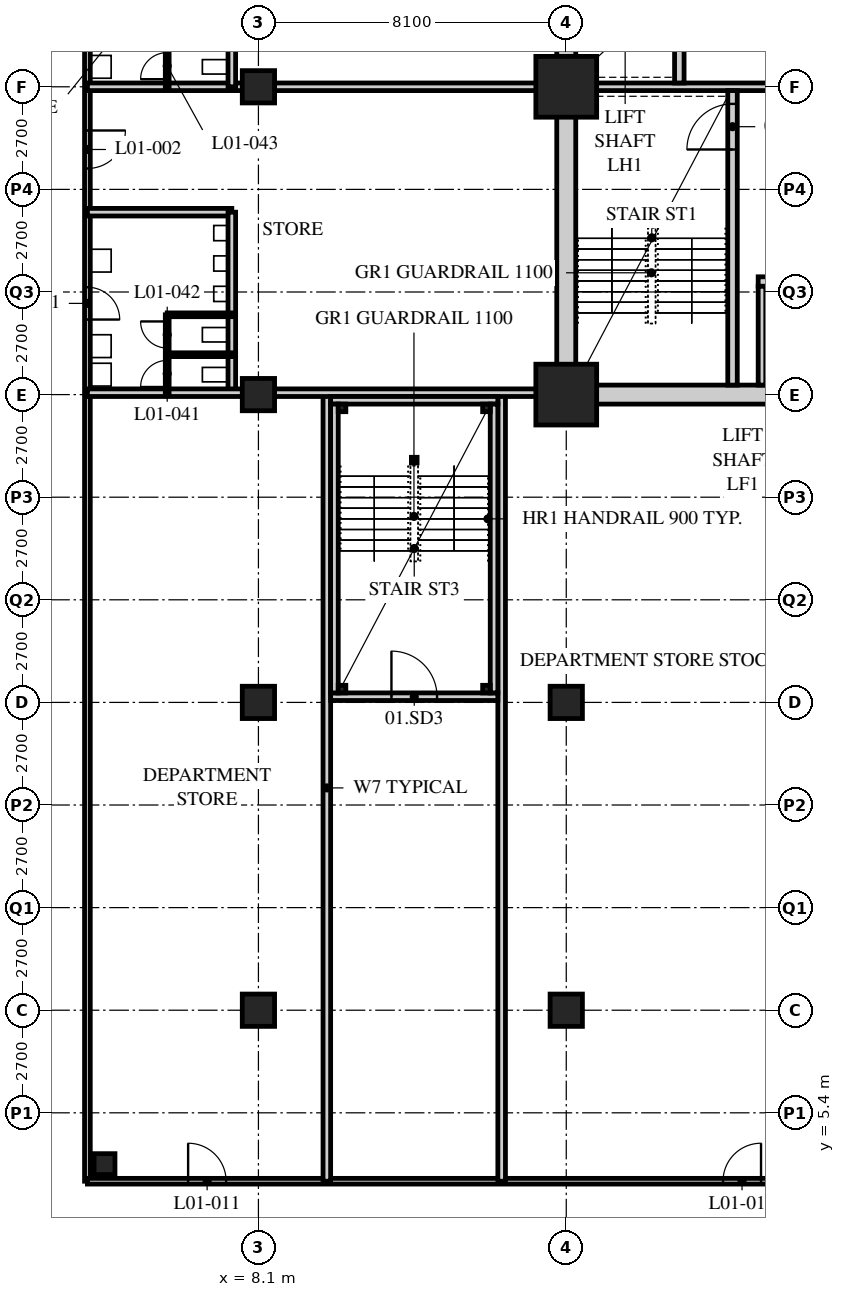
"""IFC4 building model, lengths in metres.
Left out: names, types, materials, properties, quantities, classifications, styles, units other than length and angle.
Written with IfcOpenShell. Run it as: python <this file> out.ifc"""

import sys

from ifc_helpers import new_model, si_unit, direction, frame, frame_2d, origin, origin_2d, place, context, subcontext, project, spatial, rectangle, hollow_rectangle, extrude, element, fill, save


model = new_model("IFC4")
c1 = context("Model", 3, precision=1e-05, world=origin(), true_north=direction((0.0, 1.0)))
c2 = subcontext(c1, "Body", "Model", "MODEL_VIEW")
j1 = project(units=[si_unit("LENGTHUNIT", "METRE"), si_unit("PLANEANGLEUNIT", "RADIAN")], contexts=[c1])
p1 = place(None, origin())
s1 = spatial("IfcSite", under=j1, at=p1, CompositionType="ELEMENT")
p2 = place(p1, origin())
s2 = spatial("IfcBuilding", under=s1, at=p2, CompositionType="ELEMENT")
p3 = place(p2, frame((0.0, 0.0, 6.0)))
s3 = spatial("IfcBuildingStorey", under=s2, at=p3, CompositionType="ELEMENT", Elevation=6.0)
p4 = place(p3, frame((4.05, 4.05, 0.0), z_axis=(0.0, 0.0, 1.0), x_axis=(1.0, 0.0, 0.0)))
e1 = element("IfcColumn", 1, at=p4, inside=s3, PredefinedType="COLUMN", context=c2, shape_type="SweptSolid", body=[
    extrude(hollow_rectangle(XDim=0.55, YDim=0.55, WallThickness=0.05, at=origin_2d()), origin(), (0.0, 0.0, 1.0), 5.4),
])
for number, where, z_axis, x_axis in (
    (2, (8.1, 8.1, 0.0), (0.0, 0.0, 1.0), (1.0, 0.0, 0.0)),
    (3, (8.1, 16.2, 0.0), (0.0, 0.0, 1.0), (1.0, 0.0, 0.0)),
    (4, (8.1, 24.3, 0.0), (0.0, 0.0, 1.0), (1.0, 0.0, 0.0)),
    (5, (8.1, 32.4, 0.0), (0.0, 0.0, 1.0), (1.0, 0.0, 0.0)),
    (6, (16.2, 8.1, 0.0), (0.0, 0.0, 1.0), (1.0, 0.0, 0.0)),
    (7, (16.2, 16.2, 0.0), (0.0, 0.0, 1.0), (1.0, 0.0, 0.0)),
):
    element("IfcColumn", number, at=place(p3, frame(where, z_axis=z_axis, x_axis=x_axis)), inside=s3, PredefinedType="COLUMN", context=c2, shape_type="SweptSolid", body=[
        extrude(hollow_rectangle(XDim=0.85, YDim=0.85, WallThickness=0.085, at=origin_2d()), origin(), (0.0, 0.0, 1.0), 5.4),
    ])
for number, where, z_axis, x_axis in (
    (8, (16.2, 24.3, 0.0), (0.0, 0.0, 1.0), (1.0, 0.0, 0.0)),
    (9, (16.2, 32.4, 0.0), (0.0, 0.0, 1.0), (1.0, 0.0, 0.0)),
):
    element("IfcColumn", number, at=place(p3, frame(where, z_axis=z_axis, x_axis=x_axis)), inside=s3, PredefinedType="COLUMN", context=c2, shape_type="SweptSolid", body=[
        extrude(hollow_rectangle(XDim=1.6, YDim=1.6, WallThickness=0.15, at=origin_2d()), origin(), (0.0, 0.0, 1.0), 5.4),
    ])
p5 = place(p3, frame((3.6, 40.5, 0.0), z_axis=(0.0, 0.0, 1.0), x_axis=(0.0, -1.0, 0.0)))
e10 = element("IfcWall", 10, at=p5, inside=s3, PredefinedType="PARTITIONING", context=c2, shape_type="SweptSolid", body=[
    extrude(rectangle(XDim=36.9, YDim=0.15, at=frame_2d((18.45, 0.0))), origin(), (0.0, 0.0, 1.0), 5.15),
])
p6 = place(p5, frame((13.375, 0.0, 0.0)))
e11 = element("IfcOpeningElement", 11, at=p6, cuts=e10, PredefinedType="OPENING", context=c2, shape_type="SweptSolid", body=[
    extrude(rectangle(XDim=0.85, YDim=2.1, at=frame_2d((0.425, 1.05))), frame((0.0, 0.085, 0.0), z_axis=(0.0, -1.0, 0.0), x_axis=(1.0, 0.0, 0.0)), (0.0, 0.0, 1.0), 0.17),
])
p7 = place(p5, frame((9.25, 0.0, 0.0)))
e12 = element("IfcOpeningElement", 12, at=p7, cuts=e10, PredefinedType="OPENING", context=c2, shape_type="SweptSolid", body=[
    extrude(rectangle(XDim=1.0, YDim=2.1, at=frame_2d((0.5, 1.05))), frame((0.0, 0.085, 0.0), z_axis=(0.0, -1.0, 0.0), x_axis=(1.0, 0.0, 0.0)), (0.0, 0.0, 1.0), 0.17),
])
p8 = place(p5, frame((4.875, 0.0, 0.0)))
e13 = element("IfcOpeningElement", 13, at=p8, cuts=e10, PredefinedType="OPENING", context=c2, shape_type="SweptSolid", body=[
    extrude(rectangle(XDim=0.85, YDim=2.1, at=frame_2d((0.425, 1.05))), frame((0.0, 0.085, 0.0), z_axis=(0.0, -1.0, 0.0), x_axis=(1.0, 0.0, 0.0)), (0.0, 0.0, 1.0), 0.17),
])
p9 = place(p5, frame((0.75, 0.0, 0.0)))
e14 = element("IfcOpeningElement", 14, at=p9, cuts=e10, PredefinedType="OPENING", context=c2, shape_type="SweptSolid", body=[
    extrude(rectangle(XDim=1.0, YDim=2.1, at=frame_2d((0.5, 1.05))), frame((0.0, 0.085, 0.0), z_axis=(0.0, -1.0, 0.0), x_axis=(1.0, 0.0, 0.0)), (0.0, 0.0, 1.0), 0.17),
])
p10 = place(p3, frame((3.6, 3.6, 0.0), z_axis=(0.0, 0.0, 1.0), x_axis=(1.0, 0.0, 0.0)))
e15 = element("IfcWall", 15, at=p10, inside=s3, PredefinedType="PARTITIONING", context=c2, shape_type="SweptSolid", body=[
    extrude(rectangle(XDim=23.54, YDim=0.15, at=frame_2d((11.77, 0.0))), origin(), (0.0, 0.0, 1.0), 5.15),
])
p11 = place(p10, frame((2.65, 0.0, 0.0)))
e16 = element("IfcOpeningElement", 16, at=p11, cuts=e15, PredefinedType="OPENING", context=c2, shape_type="SweptSolid", body=[
    extrude(rectangle(XDim=1.0, YDim=2.1, at=frame_2d((0.5, 1.05))), frame((0.0, 0.085, 0.0), z_axis=(0.0, -1.0, 0.0), x_axis=(1.0, 0.0, 0.0)), (0.0, 0.0, 1.0), 0.17),
])
p12 = place(p10, frame((16.725, 0.0, 0.0)))
e17 = element("IfcOpeningElement", 17, at=p12, cuts=e15, PredefinedType="OPENING", context=c2, shape_type="SweptSolid", body=[
    extrude(rectangle(XDim=1.0, YDim=2.1, at=frame_2d((0.5, 1.05))), frame((0.0, 0.085, 0.0), z_axis=(0.0, -1.0, 0.0), x_axis=(1.0, 0.0, 0.0)), (0.0, 0.0, 1.0), 0.17),
])
p13 = place(p3, frame((3.6, 32.4, 0.0), z_axis=(0.0, 0.0, 1.0), x_axis=(1.0, 0.0, 0.0)))
e18 = element("IfcWall", 18, at=p13, inside=s3, PredefinedType="SOLIDWALL", context=c2, shape_type="SweptSolid", body=[
    extrude(rectangle(XDim=12.6, YDim=0.2, at=frame_2d((6.3, 0.0))), origin(), (0.0, 0.0, 1.0), 4.538),
])
p14 = place(p3, frame((3.6, 29.1, 0.0), z_axis=(0.0, 0.0, 1.0), x_axis=(1.0, 0.0, 0.0)))
e19 = element("IfcWall", 19, at=p14, inside=s3, PredefinedType="SOLIDWALL", context=c2, shape_type="SweptSolid", body=[
    extrude(rectangle(XDim=3.8, YDim=0.2, at=frame_2d((1.9, 0.0))), origin(), (0.0, 0.0, 1.0), 5.15),
])
p15 = place(p3, frame((7.4, 24.3, 0.0), z_axis=(0.0, 0.0, 1.0), x_axis=(0.0, 1.0, 0.0)))
e20 = element("IfcWall", 20, at=p15, inside=s3, PredefinedType="SOLIDWALL", context=c2, shape_type="SweptSolid", body=[
    extrude(rectangle(XDim=4.8, YDim=0.2, at=frame_2d((2.4, 0.0))), origin(), (0.0, 0.0, 1.0), 5.15),
])
p16 = place(p3, frame((7.4, 32.4, 0.0), z_axis=(0.0, 0.0, 1.0), x_axis=(0.0, 1.0, 0.0)))
e21 = element("IfcWall", 21, at=p16, inside=s3, PredefinedType="SOLIDWALL", context=c2, shape_type="SweptSolid", body=[
    extrude(rectangle(XDim=5.6, YDim=0.2, at=frame_2d((2.8, 0.0))), origin(), (0.0, 0.0, 1.0), 5.15),
])
for number, where, z_axis, x_axis in (
    (22, (9.9, 3.6, 0.0), (0.0, 0.0, 1.0), (0.0, 1.0, 0.0)),
    (23, (14.5, 3.6, 0.0), (0.0, 0.0, 1.0), (0.0, 1.0, 0.0)),
):
    element("IfcWall", number, at=place(p3, frame(where, z_axis=z_axis, x_axis=x_axis)), inside=s3, PredefinedType="SOLIDWALL", context=c2, shape_type="SweptSolid", body=[
        extrude(rectangle(XDim=20.7, YDim=0.2, at=frame_2d((10.35, 0.0))), origin(), (0.0, 0.0, 1.0), 5.15),
    ])
p17 = place(p3, frame((3.6, 24.35, 0.0), z_axis=(0.0, 0.0, 1.0), x_axis=(1.0, 0.0, 0.0)))
e24 = element("IfcWall", 24, at=p17, inside=s3, PredefinedType="SOLIDWALL", context=c2, shape_type="SweptSolid", body=[
    extrude(rectangle(XDim=12.6, YDim=0.2, at=frame_2d((6.3, 0.0))), origin(), (0.0, 0.0, 1.0), 4.538),
])
p18 = place(p3, frame((5.7, 24.3, 0.0), z_axis=(0.0, 0.0, 1.0), x_axis=(0.0, 1.0, 0.0)))
e25 = element("IfcWall", 25, at=p18, inside=s3, PredefinedType="PARTITIONING", context=c2, shape_type="SweptSolid", body=[
    extrude(rectangle(XDim=2.1, YDim=0.1, at=frame_2d((1.05, 0.0))), origin(), (0.0, 0.0, 1.0), 5.15),
])
p19 = place(p18, frame((0.2, 0.0, 0.0)))
e26 = element("IfcOpeningElement", 26, at=p19, cuts=e25, PredefinedType="OPENING", context=c2, shape_type="SweptSolid", body=[
    extrude(rectangle(XDim=0.7, YDim=2.0, at=frame_2d((0.35, 1.0))), frame((0.0, 0.06, 0.0), z_axis=(0.0, -1.0, 0.0), x_axis=(1.0, 0.0, 0.0)), (0.0, 0.0, 1.0), 0.12),
])
p20 = place(p18, frame((1.225, 0.0, 0.0)))
e27 = element("IfcOpeningElement", 27, at=p20, cuts=e25, PredefinedType="OPENING", context=c2, shape_type="SweptSolid", body=[
    extrude(rectangle(XDim=0.7, YDim=2.0, at=frame_2d((0.35, 1.0))), frame((0.0, 0.06, 0.0), z_axis=(0.0, -1.0, 0.0), x_axis=(1.0, 0.0, 0.0)), (0.0, 0.0, 1.0), 0.12),
])
for number, where, z_axis, x_axis in (
    (28, (5.7, 25.35, 0.0), (0.0, 0.0, 1.0), (1.0, 0.0, 0.0)),
    (29, (5.7, 26.4, 0.0), (0.0, 0.0, 1.0), (1.0, 0.0, 0.0)),
):
    element("IfcWall", number, at=place(p3, frame(where, z_axis=z_axis, x_axis=x_axis)), inside=s3, PredefinedType="PARTITIONING", context=c2, shape_type="SweptSolid", body=[
        extrude(rectangle(XDim=1.7, YDim=0.1, at=frame_2d((0.85, 0.0))), origin(), (0.0, 0.0, 1.0), 5.15),
    ])
p21 = place(p3, frame((5.7, 32.4, 0.0), z_axis=(0.0, 0.0, 1.0), x_axis=(0.0, 1.0, 0.0)))
e30 = element("IfcWall", 30, at=p21, inside=s3, PredefinedType="PARTITIONING", context=c2, shape_type="SweptSolid", body=[
    extrude(rectangle(XDim=5.25, YDim=0.1, at=frame_2d((2.625, 0.0))), origin(), (0.0, 0.0, 1.0), 5.15),
])
p22 = place(p21, frame((0.2, 0.0, 0.0)))
e31 = element("IfcOpeningElement", 31, at=p22, cuts=e30, PredefinedType="OPENING", context=c2, shape_type="SweptSolid", body=[
    extrude(rectangle(XDim=0.7, YDim=2.0, at=frame_2d((0.35, 1.0))), frame((0.0, 0.06, 0.0), z_axis=(0.0, -1.0, 0.0), x_axis=(1.0, 0.0, 0.0)), (0.0, 0.0, 1.0), 0.12),
])
p23 = place(p21, frame((1.225, 0.0, 0.0)))
e32 = element("IfcOpeningElement", 32, at=p23, cuts=e30, PredefinedType="OPENING", context=c2, shape_type="SweptSolid", body=[
    extrude(rectangle(XDim=0.7, YDim=2.0, at=frame_2d((0.35, 1.0))), frame((0.0, 0.06, 0.0), z_axis=(0.0, -1.0, 0.0), x_axis=(1.0, 0.0, 0.0)), (0.0, 0.0, 1.0), 0.12),
])
p24 = place(p21, frame((2.275, 0.0, 0.0)))
e33 = element("IfcOpeningElement", 33, at=p24, cuts=e30, PredefinedType="OPENING", context=c2, shape_type="SweptSolid", body=[
    extrude(rectangle(XDim=0.7, YDim=2.0, at=frame_2d((0.35, 1.0))), frame((0.0, 0.06, 0.0), z_axis=(0.0, -1.0, 0.0), x_axis=(1.0, 0.0, 0.0)), (0.0, 0.0, 1.0), 0.12),
])
p25 = place(p21, frame((3.325, 0.0, 0.0)))
e34 = element("IfcOpeningElement", 34, at=p25, cuts=e30, PredefinedType="OPENING", context=c2, shape_type="SweptSolid", body=[
    extrude(rectangle(XDim=0.7, YDim=2.0, at=frame_2d((0.35, 1.0))), frame((0.0, 0.06, 0.0), z_axis=(0.0, -1.0, 0.0), x_axis=(1.0, 0.0, 0.0)), (0.0, 0.0, 1.0), 0.12),
])
p26 = place(p21, frame((4.375, 0.0, 0.0)))
e35 = element("IfcOpeningElement", 35, at=p26, cuts=e30, PredefinedType="OPENING", context=c2, shape_type="SweptSolid", body=[
    extrude(rectangle(XDim=0.7, YDim=2.0, at=frame_2d((0.35, 1.0))), frame((0.0, 0.06, 0.0), z_axis=(0.0, -1.0, 0.0), x_axis=(1.0, 0.0, 0.0)), (0.0, 0.0, 1.0), 0.12),
])
p27 = place(p3, frame((15.95, 24.3, 0.0), z_axis=(0.0, 0.0, 1.0), x_axis=(1.0, 0.0, 0.0)))
e36 = element("IfcWall", 36, at=p27, inside=s3, PredefinedType="SOLIDWALL", context=c2, shape_type="SweptSolid", body=[
    extrude(rectangle(XDim=24.8, YDim=0.5, at=frame_2d((12.4, 0.0))), origin(), (0.0, 0.0, 1.0), 4.5),
])
p28 = place(p27, frame((11.5, 0.0, 0.0)))
e37 = element("IfcOpeningElement", 37, at=p28, cuts=e36, PredefinedType="OPENING", context=c2, shape_type="SweptSolid", body=[
    extrude(rectangle(XDim=1.8, YDim=2.4, at=frame_2d((0.9, 1.2))), frame((0.0, 0.26, 0.0), z_axis=(0.0, -1.0, 0.0), x_axis=(1.0, 0.0, 0.0)), (0.0, 0.0, 1.0), 0.52),
])
p29 = place(p3, frame((16.2, 24.55, 0.0), z_axis=(0.0, 0.0, 1.0), x_axis=(0.0, 1.0, 0.0)))
e38 = element("IfcWall", 38, at=p29, inside=s3, PredefinedType="SOLIDWALL", context=c2, shape_type="SweptSolid", body=[
    extrude(rectangle(XDim=15.7, YDim=0.5, at=frame_2d((7.85, 0.0))), origin(), (0.0, 0.0, 1.0), 4.538),
])
p30 = place(p3, frame((16.45, 32.4, 0.0), z_axis=(0.0, 0.0, 1.0), x_axis=(1.0, 0.0, 0.0)))
e39 = element("IfcWall", 39, at=p30, inside=s3, PredefinedType="SOLIDWALL", context=c2, shape_type="SweptSolid", body=[
    extrude(rectangle(XDim=7.95, YDim=0.2, at=frame_2d((3.975, 0.0))), origin(), (0.0, 0.0, 1.0), 4.45),
])
p31 = place(p3, frame((20.575, 24.55, 0.0), z_axis=(0.0, 0.0, 1.0), x_axis=(0.0, 1.0, 0.0)))
e40 = element("IfcWall", 40, at=p31, inside=s3, PredefinedType="SOLIDWALL", context=c2, shape_type="SweptSolid", body=[
    extrude(rectangle(XDim=7.75, YDim=0.25, at=frame_2d((3.875, 0.0))), origin(), (0.0, 0.0, 1.0), 5.15),
])
p32 = place(p31, frame((6.2, 0.0, 0.0)))
e41 = element("IfcOpeningElement", 41, at=p32, cuts=e40, PredefinedType="OPENING", context=c2, shape_type="SweptSolid", body=[
    extrude(rectangle(XDim=1.2, YDim=2.1, at=frame_2d((0.6, 1.05))), frame((0.0, 0.135, 0.0), z_axis=(0.0, -1.0, 0.0), x_axis=(1.0, 0.0, 0.0)), (0.0, 0.0, 1.0), 0.27),
])
p33 = place(p3, frame((21.25, 27.275, 0.0), z_axis=(0.0, 0.0, 1.0), x_axis=(1.0, 0.0, 0.0)))
e42 = element("IfcWall", 42, at=p33, inside=s3, PredefinedType="SOLIDWALL", context=c2, shape_type="SweptSolid", body=[
    extrude(rectangle(XDim=2.95, YDim=0.25, at=frame_2d((1.475, 0.0))), origin(), (0.0, 0.0, 1.0), 5.15),
])
p34 = place(p33, frame((0.95, 0.0, 0.0)))
e43 = element("IfcOpeningElement", 43, at=p34, cuts=e42, PredefinedType="OPENING", context=c2, shape_type="SweptSolid", body=[
    extrude(rectangle(XDim=1.1, YDim=2.4, at=frame_2d((0.55, 1.2))), frame((0.0, 0.135, 0.0), z_axis=(0.0, -1.0, 0.0), x_axis=(1.0, 0.0, 0.0)), (0.0, 0.0, 1.0), 0.27),
])
p35 = place(p3, frame((21.35, 24.55, 0.0), z_axis=(0.0, 0.0, 1.0), x_axis=(0.0, 1.0, 0.0)))
e44 = element("IfcWall", 44, at=p35, inside=s3, PredefinedType="SOLIDWALL", context=c2, shape_type="SweptSolid", body=[
    extrude(rectangle(XDim=2.6, YDim=0.2, at=frame_2d((1.3, 0.0))), origin(), (0.0, 0.0, 1.0), 5.15),
])
p36 = place(p3, frame((19.175, 32.5, 0.0), z_axis=(0.0, 0.0, 1.0), x_axis=(0.0, 1.0, 0.0)))
e45 = element("IfcWall", 45, at=p36, inside=s3, PredefinedType="SOLIDWALL", context=c2, shape_type="SweptSolid", body=[
    extrude(rectangle(XDim=7.75, YDim=0.25, at=frame_2d((3.875, 0.0))), origin(), (0.0, 0.0, 1.0), 5.15),
])
p37 = place(p3, frame((10.0, 16.35, 0.0), z_axis=(0.0, 0.0, 1.0), x_axis=(1.0, 0.0, 0.0)))
e46 = element("IfcWall", 46, at=p37, inside=s3, PredefinedType="SOLIDWALL", context=c2, shape_type="SweptSolid", body=[
    extrude(rectangle(XDim=4.4, YDim=0.2, at=frame_2d((2.2, 0.0))), origin(), (0.0, 0.0, 1.0), 4.538),
])
p38 = place(p37, frame((1.6, 0.0, 0.0)))
e47 = element("IfcOpeningElement", 47, at=p38, cuts=e46, PredefinedType="OPENING", context=c2, shape_type="SweptSolid", body=[
    extrude(rectangle(XDim=1.2, YDim=2.1, at=frame_2d((0.6, 1.05))), frame((0.0, 0.11, 0.0), z_axis=(0.0, -1.0, 0.0), x_axis=(1.0, 0.0, 0.0)), (0.0, 0.0, 1.0), 0.22),
])
p39 = place(p3, frame((10.0, 24.15, 0.0), z_axis=(0.0, 0.0, 1.0), x_axis=(1.0, 0.0, 0.0)))
e48 = element("IfcWall", 48, at=p39, inside=s3, PredefinedType="SOLIDWALL", context=c2, shape_type="SweptSolid", body=[
    extrude(rectangle(XDim=4.4, YDim=0.2, at=frame_2d((2.2, 0.0))), origin(), (0.0, 0.0, 1.0), 4.538),
])
for number, where, z_axis, x_axis in (
    (49, (10.1, 16.45, 0.0), (0.0, 0.0, 1.0), (0.0, 1.0, 0.0)),
    (50, (14.3, 16.45, 0.0), (0.0, 0.0, 1.0), (0.0, 1.0, 0.0)),
):
    element("IfcWall", number, at=place(p3, frame(where, z_axis=z_axis, x_axis=x_axis)), inside=s3, PredefinedType="SOLIDWALL", context=c2, shape_type="SweptSolid", body=[
        extrude(rectangle(XDim=7.6, YDim=0.2, at=frame_2d((3.8, 0.0))), origin(), (0.0, 0.0, 1.0), 5.15),
    ])
for number, where, z_axis, x_axis in (
    (51, (10.3, 23.95, 0.0), (0.0, 0.0, 1.0), (1.0, 0.0, 0.0)),
    (52, (14.1, 23.95, 0.0), (0.0, 0.0, 1.0), (1.0, 0.0, 0.0)),
    (53, (10.3, 16.55, 0.0), (0.0, 0.0, 1.0), (1.0, 0.0, 0.0)),
    (54, (14.1, 16.55, 0.0), (0.0, 0.0, 1.0), (1.0, 0.0, 0.0)),
):
    element("IfcColumn", number, at=place(p3, frame(where, z_axis=z_axis, x_axis=x_axis)), inside=s3, PredefinedType="COLUMN", context=c2, shape_type="SweptSolid", body=[
        extrude(hollow_rectangle(XDim=0.2, YDim=0.2, WallThickness=0.012, at=origin_2d()), origin(), (0.0, 0.0, 1.0), 5.4),
    ])
p40 = place(p3, frame((12.2, 22.575, 0.0), z_axis=(0.0, 0.0, 1.0), x_axis=(1.0, 0.0, 0.0)))
e55 = element("IfcColumn", 55, at=p40, inside=s3, PredefinedType="COLUMN", context=c2, shape_type="SweptSolid", body=[
    extrude(hollow_rectangle(XDim=0.15, YDim=0.15, WallThickness=0.01, at=origin_2d()), origin(), (0.0, 0.0, 1.0), 5.4),
])
p41 = place(p6, origin())
e56 = element("IfcDoor", 56, at=p41, inside=s3, OperationType="SINGLE_SWING_RIGHT", PredefinedType="DOOR", context=c2, shape_type="SweptSolid", body=[
    extrude(rectangle(XDim=0.85, YDim=2.1, at=frame_2d((0.425, 1.05))), frame((0.0, 0.025, 0.0), z_axis=(0.0, -1.0, 0.0), x_axis=(1.0, 0.0, 0.0)), (0.0, 0.0, 1.0), 0.05),
])
fill(e11, e56)
p42 = place(p7, origin())
e57 = element("IfcDoor", 57, at=p42, inside=s3, OperationType="SINGLE_SWING_LEFT", PredefinedType="DOOR", context=c2, shape_type="SweptSolid", body=[
    extrude(rectangle(XDim=1.0, YDim=2.1, at=frame_2d((0.5, 1.05))), frame((0.0, 0.025, 0.0), z_axis=(0.0, -1.0, 0.0), x_axis=(1.0, 0.0, 0.0)), (0.0, 0.0, 1.0), 0.05),
])
fill(e12, e57)
p43 = place(p11, origin())
e58 = element("IfcDoor", 58, at=p43, inside=s3, OperationType="SINGLE_SWING_LEFT", PredefinedType="DOOR", context=c2, shape_type="SweptSolid", body=[
    extrude(rectangle(XDim=1.0, YDim=2.1, at=frame_2d((0.5, 1.05))), frame((0.0, 0.025, 0.0), z_axis=(0.0, -1.0, 0.0), x_axis=(1.0, 0.0, 0.0)), (0.0, 0.0, 1.0), 0.05),
])
fill(e16, e58)
p44 = place(p12, origin())
e59 = element("IfcDoor", 59, at=p44, inside=s3, OperationType="SINGLE_SWING_RIGHT", PredefinedType="DOOR", context=c2, shape_type="SweptSolid", body=[
    extrude(rectangle(XDim=1.0, YDim=2.1, at=frame_2d((0.5, 1.05))), frame((0.0, 0.025, 0.0), z_axis=(0.0, -1.0, 0.0), x_axis=(1.0, 0.0, 0.0)), (0.0, 0.0, 1.0), 0.05),
])
fill(e17, e59)
p45 = place(p19, origin())
e60 = element("IfcDoor", 60, at=p45, inside=s3, OperationType="SINGLE_SWING_LEFT", PredefinedType="DOOR", context=c2, shape_type="SweptSolid", body=[
    extrude(rectangle(XDim=0.7, YDim=2.0, at=frame_2d((0.35, 1.0))), frame((0.0, 0.025, 0.0), z_axis=(0.0, -1.0, 0.0), x_axis=(1.0, 0.0, 0.0)), (0.0, 0.0, 1.0), 0.05),
])
fill(e26, e60)
p46 = place(p20, origin())
e61 = element("IfcDoor", 61, at=p46, inside=s3, OperationType="SINGLE_SWING_RIGHT", PredefinedType="DOOR", context=c2, shape_type="SweptSolid", body=[
    extrude(rectangle(XDim=0.7, YDim=2.0, at=frame_2d((0.35, 1.0))), frame((0.0, 0.025, 0.0), z_axis=(0.0, -1.0, 0.0), x_axis=(1.0, 0.0, 0.0)), (0.0, 0.0, 1.0), 0.05),
])
fill(e27, e61)
p47 = place(p22, origin())
e62 = element("IfcDoor", 62, at=p47, inside=s3, OperationType="SINGLE_SWING_LEFT", PredefinedType="DOOR", context=c2, shape_type="SweptSolid", body=[
    extrude(rectangle(XDim=0.7, YDim=2.0, at=frame_2d((0.35, 1.0))), frame((0.0, 0.025, 0.0), z_axis=(0.0, -1.0, 0.0), x_axis=(1.0, 0.0, 0.0)), (0.0, 0.0, 1.0), 0.05),
])
fill(e31, e62)
p48 = place(p32, origin())
e63 = element("IfcDoor", 63, at=p48, inside=s3, OperationType="SINGLE_SWING_LEFT", PredefinedType="DOOR", context=c2, shape_type="SweptSolid", body=[
    extrude(rectangle(XDim=1.2, YDim=2.1, at=frame_2d((0.6, 1.05))), frame((0.0, 0.025, 0.0), z_axis=(0.0, -1.0, 0.0), x_axis=(1.0, 0.0, 0.0)), (0.0, 0.0, 1.0), 0.05),
])
fill(e41, e63)
p49 = place(p38, origin())
e64 = element("IfcDoor", 64, at=p49, inside=s3, OperationType="SINGLE_SWING_LEFT", PredefinedType="DOOR", context=c2, shape_type="SweptSolid", body=[
    extrude(rectangle(XDim=1.2, YDim=2.1, at=frame_2d((0.6, 1.05))), frame((0.0, 0.025, 0.0), z_axis=(0.0, -1.0, 0.0), x_axis=(1.0, 0.0, 0.0)), (0.0, 0.0, 1.0), 0.05),
])
fill(e47, e64)
save(model, sys.argv[1])
